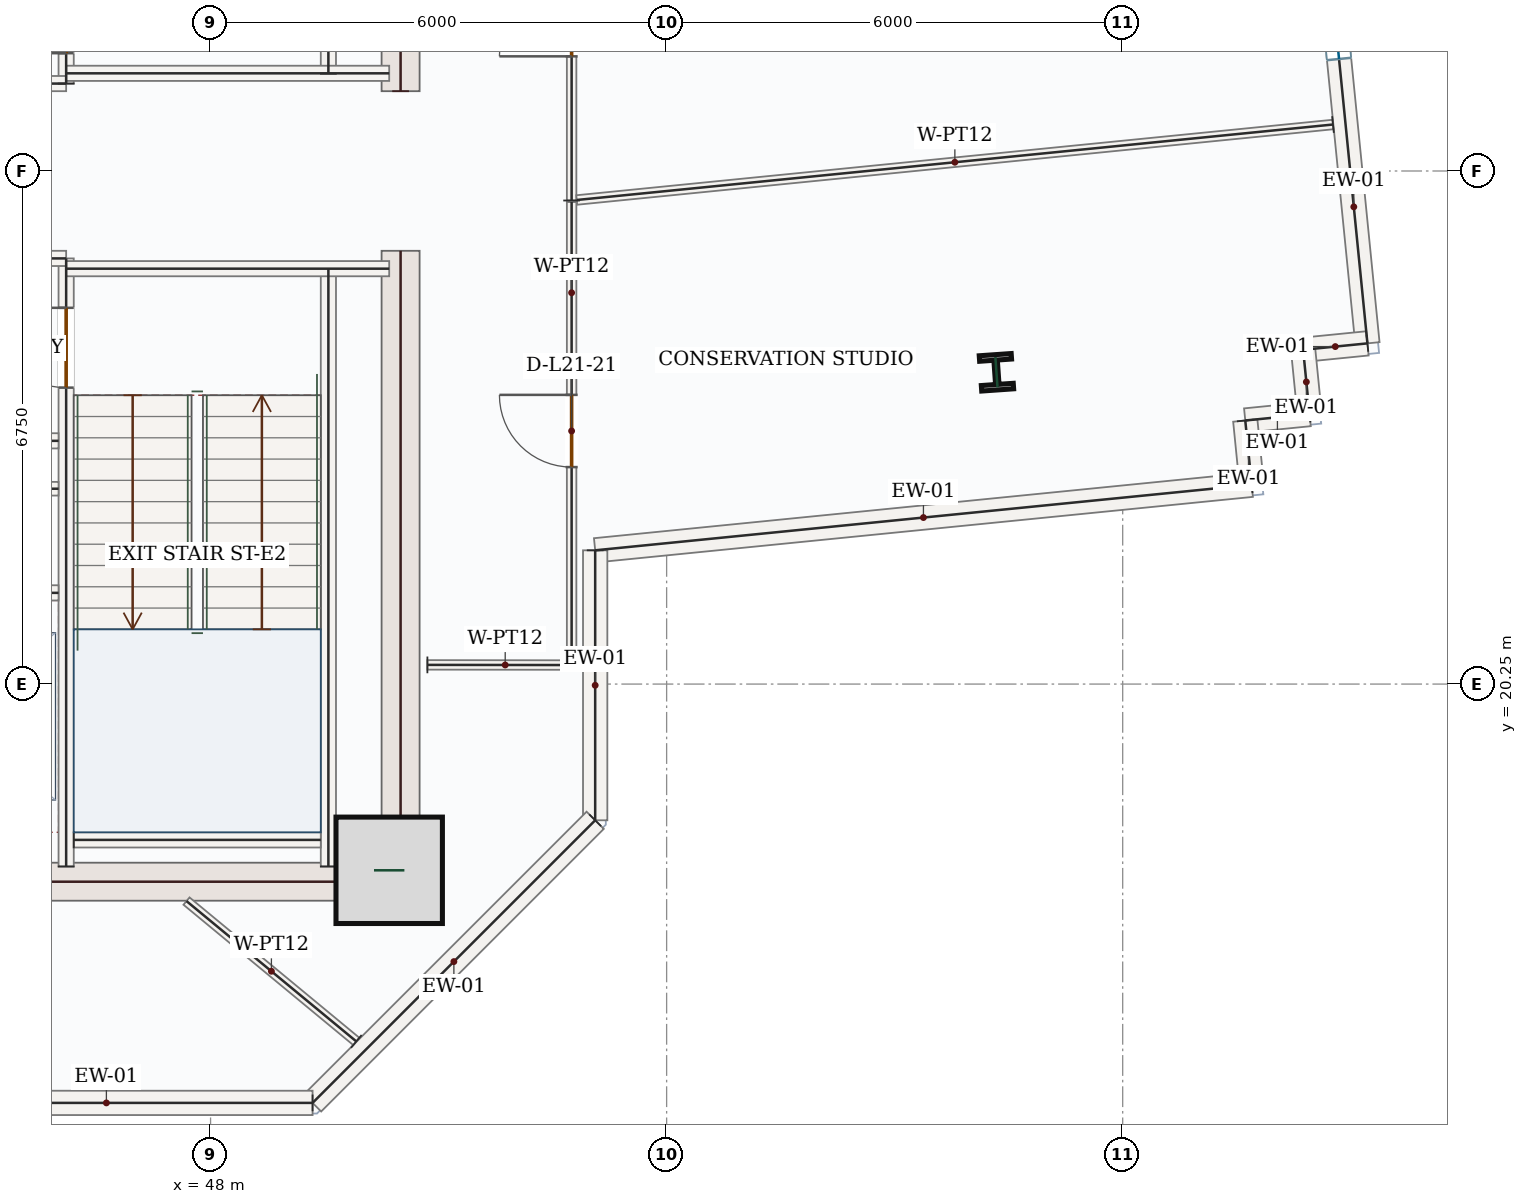
"""IFC4 building model, lengths in metres.
Left out: names, types, materials, properties, quantities, classifications, styles, units other than length and angle.
Written with IfcOpenShell. Run it as: python <this file> out.ifc"""

import sys

from ifc_helpers import new_model, si_unit, direction, frame, frame_2d, origin, origin_2d, place, context, subcontext, project, spatial, rectangle, i_section, extrude, source, transform, mapped, element, fill, save


model = new_model("IFC4")
c1 = context("Model", 3, precision=1e-05, world=origin(), true_north=direction((0.0, 1.0)))
c2 = subcontext(c1, "Body", "Model", "MODEL_VIEW")
j1 = project(units=[si_unit("LENGTHUNIT", "METRE"), si_unit("PLANEANGLEUNIT", "RADIAN")], contexts=[c1])
p1 = place(None, origin())
s1 = spatial("IfcSite", under=j1, at=p1, CompositionType="ELEMENT")
p2 = place(p1, origin())
s2 = spatial("IfcBuilding", under=s1, at=p2, CompositionType="ELEMENT")
p3 = place(p2, frame((0.0, 0.0, 96.3)))
s3 = spatial("IfcBuildingStorey", under=s2, at=p3, CompositionType="ELEMENT", Elevation=96.3)
m1 = source(origin(), c2, "Body", "SweptSolid", [
    extrude(rectangle(XDim=8.55, YDim=0.5, at=frame_2d((4.275, 0.0))), origin(), (0.0, 0.0, 1.0), 3.95),
])
for number, where, z_axis, x_axis in (
    (1, (50.5, 17.4, 0.0), (0.0, 0.0, 1.0), (0.0, 1.0, 0.0)),
    (2, (50.5, 28.05, 0.0), (0.0, 0.0, 1.0), (0.0, 1.0, 0.0)),
):
    element("IfcWall", number, at=place(p3, frame(where, z_axis=z_axis, x_axis=x_axis)), inside=s3, PredefinedType="SHEAR", context=c2, shape_type="MappedRepresentation", body=[
        mapped(m1, transform((0.0, 0.0, 0.0), x_axis=(1.0, 0.0, 0.0), y_axis=(0.0, 1.0, 0.0), z_axis=(0.0, 0.0, 1.0), scale=1.0)),
    ])
m2 = source(origin(), c2, "Body", "SweptSolid", [
    extrude(rectangle(XDim=7.0, YDim=0.5, at=frame_2d((3.5, 0.0))), origin(), (0.0, 0.0, 1.0), 3.95),
])
p4 = place(p3, frame((43.25, 17.65, 0.0), z_axis=(0.0, 0.0, 1.0), x_axis=(1.0, 0.0, 0.0)))
e3 = element("IfcWall", 3, at=p4, inside=s3, PredefinedType="SHEAR", context=c2, shape_type="MappedRepresentation", body=[
    mapped(m2, transform((0.0, 0.0, 0.0), x_axis=(1.0, 0.0, 0.0), y_axis=(0.0, 1.0, 0.0), z_axis=(0.0, 0.0, 1.0), scale=1.0)),
])
m3 = source(origin(), c2, "Body", "SweptSolid", [
    extrude(rectangle(XDim=1.4, YDim=1.4, at=origin_2d()), origin(), (0.0, 0.0, 1.0), 4.2),
])
p5 = place(p3, frame((50.35, 17.8, 0.0), z_axis=(0.0, 0.0, 1.0), x_axis=(1.0, 0.0, 0.0)))
e4 = element("IfcColumn", 4, at=p5, inside=s3, PredefinedType="COLUMN", context=c2, shape_type="MappedRepresentation", body=[
    mapped(m3, transform((0.0, 0.0, 0.0), x_axis=(1.0, 0.0, 0.0), y_axis=(0.0, 1.0, 0.0), z_axis=(0.0, 0.0, 1.0), scale=1.0)),
])
m4 = source(origin(), c2, "Body", "SweptSolid", [
    extrude(i_section(OverallWidth=0.421, OverallDepth=0.465, WebThickness=0.045, FlangeThickness=0.073, FilletRadius=0.018, at=origin_2d()), origin(), (0.0, 0.0, 1.0), 4.2),
])
p6 = place(p3, frame((58.339, 24.352, 0.0), z_axis=(0.0, 0.0, 1.0), x_axis=(0.99756405026, 0.069756473744, 0.0)))
e5 = element("IfcColumn", 5, at=p6, inside=s3, PredefinedType="COLUMN", context=c2, shape_type="MappedRepresentation", body=[
    mapped(m4, transform((0.0, 0.0, 0.0), x_axis=(1.0, 0.0, 0.0), y_axis=(0.0, 1.0, 0.0), z_axis=(0.0, 0.0, 1.0), scale=1.0)),
])
p7 = place(p3, frame((62.235, 34.603, 0.0), z_axis=(0.0, 0.0, 1.0), x_axis=(0.099303907908, -0.995057151059, 0.0)))
e6 = element("IfcWall", 6, at=p7, inside=s3, PredefinedType="SOLIDWALL", context=c2, shape_type="SweptSolid", body=[
    extrude(rectangle(XDim=9.92, YDim=0.32, at=frame_2d((4.96, 0.0))), origin(), (0.0, 0.0, 1.0), 3.95),
])
p8 = place(p7, frame((3.76, 0.0, 0.85)))
e7 = element("IfcOpeningElement", 7, at=p8, cuts=e6, PredefinedType="OPENING", context=c2, shape_type="SweptSolid", body=[
    extrude(rectangle(XDim=2.4, YDim=1.8, at=frame_2d((1.2, 0.9))), frame((0.0, 0.17, 0.0), z_axis=(0.0, -1.0, 0.0), x_axis=(1.0, 0.0, 0.0)), (0.0, 0.0, 1.0), 0.34),
])
m5 = source(origin(), c2, "Body", "SweptSolid", [
    extrude(rectangle(XDim=0.85, YDim=0.32, at=frame_2d((0.425, 0.0))), origin(), (0.0, 0.0, 1.0), 3.95),
])
for number, where, z_axis, x_axis in (
    (8, (63.22, 24.732, 0.0), (0.0, 0.0, 1.0), (-0.995, -0.099, 0.0)),
    (9, (62.374, 24.648, 0.0), (0.0, 0.0, 1.0), (0.099, -0.995, 0.0)),
    (10, (62.458, 23.802, 0.0), (0.0, 0.0, 1.0), (-0.995, -0.099, 0.0)),
    (11, (61.613, 23.718, 0.0), (0.0, 0.0, 1.0), (0.099, -0.995, 0.0)),
):
    element("IfcWall", number, at=place(p3, frame(where, z_axis=z_axis, x_axis=x_axis)), inside=s3, PredefinedType="SOLIDWALL", context=c2, shape_type="MappedRepresentation", body=[
        mapped(m5, transform((0.0, 0.0, 0.0), x_axis=(1.0, 0.0, 0.0), y_axis=(0.0, 1.0, 0.0), z_axis=(0.0, 0.0, 1.0), scale=1.0)),
    ])
m6 = source(origin(), c2, "Body", "SweptSolid", [
    extrude(rectangle(XDim=8.68, YDim=0.32, at=frame_2d((4.34, 0.0))), origin(), (0.0, 0.0, 1.0), 3.95),
])
p9 = place(p3, frame((61.697, 22.872, 0.0), z_axis=(0.0, 0.0, 1.0), x_axis=(-0.995055831351, -0.099317130918, 0.0)))
e12 = element("IfcWall", 12, at=p9, inside=s3, PredefinedType="SOLIDWALL", context=c2, shape_type="MappedRepresentation", body=[
    mapped(m6, transform((0.0, 0.0, 0.0), x_axis=(1.0, 0.0, 0.0), y_axis=(0.0, 1.0, 0.0), z_axis=(0.0, 0.0, 1.0), scale=1.0)),
])
m7 = source(origin(), c2, "Body", "SweptSolid", [
    extrude(rectangle(XDim=3.552, YDim=0.32, at=frame_2d((1.776, 0.0))), origin(), (0.0, 0.0, 1.0), 3.95),
])
p10 = place(p3, frame((53.06, 22.01, 0.0), z_axis=(0.0, 0.0, 1.0), x_axis=(0.0, -1.0, 0.0)))
e13 = element("IfcWall", 13, at=p10, inside=s3, PredefinedType="SOLIDWALL", context=c2, shape_type="MappedRepresentation", body=[
    mapped(m7, transform((0.0, 0.0, 0.0), x_axis=(1.0, 0.0, 0.0), y_axis=(0.0, 1.0, 0.0), z_axis=(0.0, 0.0, 1.0), scale=1.0)),
])
m8 = source(origin(), c2, "Body", "SweptSolid", [
    extrude(rectangle(XDim=5.258, YDim=0.32, at=frame_2d((2.629, 0.0))), origin(), (0.0, 0.0, 1.0), 3.95),
])
p11 = place(p3, frame((53.06, 18.458, 0.0), z_axis=(0.0, 0.0, 1.0), x_axis=(-0.707106781187, -0.707106781187, 0.0)))
e14 = element("IfcWall", 14, at=p11, inside=s3, PredefinedType="SOLIDWALL", context=c2, shape_type="MappedRepresentation", body=[
    mapped(m8, transform((0.0, 0.0, 0.0), x_axis=(1.0, 0.0, 0.0), y_axis=(0.0, 1.0, 0.0), z_axis=(0.0, 0.0, 1.0), scale=1.0)),
])
m9 = source(origin(), c2, "Body", "SweptSolid", [
    extrude(rectangle(XDim=5.425, YDim=0.32, at=frame_2d((2.713, 0.0))), origin(), (0.0, 0.0, 1.0), 3.95),
])
p12 = place(p3, frame((49.342, 14.74, 0.0), z_axis=(0.0, 0.0, 1.0), x_axis=(-1.0, 0.0, 0.0)))
e15 = element("IfcWall", 15, at=p12, inside=s3, PredefinedType="SOLIDWALL", context=c2, shape_type="MappedRepresentation", body=[
    mapped(m9, transform((0.0, 0.0, 0.0), x_axis=(1.0, 0.0, 0.0), y_axis=(0.0, 1.0, 0.0), z_axis=(0.0, 0.0, 1.0), scale=1.0)),
])
m10 = source(origin(), c2, "Body", "SweptSolid", [
    extrude(rectangle(XDim=7.87, YDim=0.2, at=frame_2d((3.935, 0.0))), origin(), (0.0, 0.0, 1.0), 3.95),
])
for number, where, z_axis, x_axis in (
    (16, (49.55, 17.85, 0.0), (0.0, 0.0, 1.0), (0.0, 1.0, 0.0)),
    (17, (49.55, 28.28, 0.0), (0.0, 0.0, 1.0), (0.0, 1.0, 0.0)),
):
    element("IfcWall", number, at=place(p3, frame(where, z_axis=z_axis, x_axis=x_axis)), inside=s3, PredefinedType="SOLIDWALL", context=c2, shape_type="MappedRepresentation", body=[
        mapped(m10, transform((0.0, 0.0, 0.0), x_axis=(1.0, 0.0, 0.0), y_axis=(0.0, 1.0, 0.0), z_axis=(0.0, 0.0, 1.0), scale=1.0)),
    ])
p13 = place(p3, frame((46.1, 17.85, 0.0), z_axis=(0.0, 0.0, 1.0), x_axis=(0.0, 1.0, 0.0)))
e18 = element("IfcWall", 18, at=p13, inside=s3, PredefinedType="SOLIDWALL", context=c2, shape_type="SweptSolid", body=[
    extrude(rectangle(XDim=8.0, YDim=0.2, at=frame_2d((4.0, 0.0))), origin(), (0.0, 0.0, 1.0), 3.95),
])
p14 = place(p13, frame((6.3, 0.0, 0.0)))
e19 = element("IfcOpeningElement", 19, at=p14, cuts=e18, PredefinedType="OPENING", context=c2, shape_type="SweptSolid", body=[
    extrude(rectangle(XDim=1.05, YDim=2.15, at=frame_2d((0.525, 1.075))), frame((0.0, 0.11, 0.0), z_axis=(0.0, -1.0, 0.0), x_axis=(1.0, 0.0, 0.0)), (0.0, 0.0, 1.0), 0.22),
])
p15 = place(p3, frame((46.1, 28.15, 0.0), z_axis=(0.0, 0.0, 1.0), x_axis=(0.0, 1.0, 0.0)))
e20 = element("IfcWall", 20, at=p15, inside=s3, PredefinedType="SOLIDWALL", context=c2, shape_type="SweptSolid", body=[
    extrude(rectangle(XDim=8.0, YDim=0.2, at=frame_2d((4.0, 0.0))), origin(), (0.0, 0.0, 1.0), 3.95),
])
p16 = place(p15, frame((0.4, 0.0, 0.0)))
e21 = element("IfcOpeningElement", 21, at=p16, cuts=e20, PredefinedType="OPENING", context=c2, shape_type="SweptSolid", body=[
    extrude(rectangle(XDim=1.05, YDim=2.15, at=frame_2d((0.525, 1.075))), frame((0.0, 0.11, 0.0), z_axis=(0.0, -1.0, 0.0), x_axis=(1.0, 0.0, 0.0)), (0.0, 0.0, 1.0), 0.22),
])
m11 = source(origin(), c2, "Body", "SweptSolid", [
    extrude(rectangle(XDim=3.0, YDim=0.2, at=frame_2d((1.5, 0.0))), origin(), (0.0, 0.0, 1.0), 3.95),
])
p17 = place(p3, frame((43.1, 25.85, 0.0), z_axis=(0.0, 0.0, 1.0), x_axis=(1.0, 0.0, 0.0)))
e22 = element("IfcWall", 22, at=p17, inside=s3, PredefinedType="SOLIDWALL", context=c2, shape_type="MappedRepresentation", body=[
    mapped(m11, transform((0.0, 0.0, 0.0), x_axis=(1.0, 0.0, 0.0), y_axis=(0.0, 1.0, 0.0), z_axis=(0.0, 0.0, 1.0), scale=1.0)),
])
m12 = source(origin(), c2, "Body", "SweptSolid", [
    extrude(rectangle(XDim=4.25, YDim=0.2, at=frame_2d((2.125, 0.0))), origin(), (0.0, 0.0, 1.0), 3.95),
])
p18 = place(p3, frame((46.1, 25.715, 0.0), z_axis=(0.0, 0.0, 1.0), x_axis=(1.0, 0.0, 0.0)))
e23 = element("IfcWall", 23, at=p18, inside=s3, PredefinedType="SOLIDWALL", context=c2, shape_type="MappedRepresentation", body=[
    mapped(m12, transform((0.0, 0.0, 0.0), x_axis=(1.0, 0.0, 0.0), y_axis=(0.0, 1.0, 0.0), z_axis=(0.0, 0.0, 1.0), scale=1.0)),
])
p19 = place(p3, frame((43.1, 28.15, 0.0), z_axis=(0.0, 0.0, 1.0), x_axis=(1.0, 0.0, 0.0)))
e24 = element("IfcWall", 24, at=p19, inside=s3, PredefinedType="SOLIDWALL", context=c2, shape_type="MappedRepresentation", body=[
    mapped(m11, transform((0.0, 0.0, 0.0), x_axis=(1.0, 0.0, 0.0), y_axis=(0.0, 1.0, 0.0), z_axis=(0.0, 0.0, 1.0), scale=1.0)),
])
p20 = place(p3, frame((46.1, 28.285, 0.0), z_axis=(0.0, 0.0, 1.0), x_axis=(1.0, 0.0, 0.0)))
e25 = element("IfcWall", 25, at=p20, inside=s3, PredefinedType="SOLIDWALL", context=c2, shape_type="MappedRepresentation", body=[
    mapped(m12, transform((0.0, 0.0, 0.0), x_axis=(1.0, 0.0, 0.0), y_axis=(0.0, 1.0, 0.0), z_axis=(0.0, 0.0, 1.0), scale=1.0)),
])
m13 = source(origin(), c2, "Body", "SweptSolid", [
    extrude(rectangle(XDim=3.25, YDim=0.2, at=frame_2d((1.625, 0.0))), origin(), (0.0, 0.0, 1.0), 3.95),
])
p21 = place(p3, frame((46.2, 18.2, 0.0), z_axis=(0.0, 0.0, 1.0), x_axis=(1.0, 0.0, 0.0)))
e26 = element("IfcWall", 26, at=p21, inside=s3, PredefinedType="SOLIDWALL", context=c2, shape_type="MappedRepresentation", body=[
    mapped(m13, transform((0.0, 0.0, 0.0), x_axis=(1.0, 0.0, 0.0), y_axis=(0.0, 1.0, 0.0), z_axis=(0.0, 0.0, 1.0), scale=1.0)),
])
m14 = source(origin(), c2, "Body", "SweptSolid", [
    extrude(rectangle(XDim=2.75, YDim=0.2, at=frame_2d((1.375, 0.0))), origin(), (0.0, 0.0, 1.0), 3.95),
])
for number, where, z_axis, x_axis in (
    (27, (43.25, 23.45, 0.0), (0.0, 0.0, 1.0), (1.0, 0.0, 0.0)),
    (28, (43.25, 21.45, 0.0), (0.0, 0.0, 1.0), (1.0, 0.0, 0.0)),
):
    element("IfcWall", number, at=place(p3, frame(where, z_axis=z_axis, x_axis=x_axis)), inside=s3, PredefinedType="SOLIDWALL", context=c2, shape_type="MappedRepresentation", body=[
        mapped(m14, transform((0.0, 0.0, 0.0), x_axis=(1.0, 0.0, 0.0), y_axis=(0.0, 1.0, 0.0), z_axis=(0.0, 0.0, 1.0), scale=1.0)),
    ])
m15 = source(origin(), c2, "Body", "SweptSolid", [
    extrude(rectangle(XDim=2.75, YDim=0.18, at=frame_2d((1.375, 0.0))), origin(), (0.0, 0.0, 1.0), 3.95),
])
p22 = place(p3, frame((43.25, 22.82, 0.0), z_axis=(0.0, 0.0, 1.0), x_axis=(1.0, 0.0, 0.0)))
e29 = element("IfcWall", 29, at=p22, inside=s3, PredefinedType="PARTITIONING", context=c2, shape_type="MappedRepresentation", body=[
    mapped(m15, transform((0.0, 0.0, 0.0), x_axis=(1.0, 0.0, 0.0), y_axis=(0.0, 1.0, 0.0), z_axis=(0.0, 0.0, 1.0), scale=1.0)),
])
p23 = place(p3, frame((52.75, 26.612, 0.0), z_axis=(0.0, 0.0, 1.0), x_axis=(0.0, 1.0, 0.0)))
e30 = element("IfcWall", 30, at=p23, inside=s3, PredefinedType="PARTITIONING", context=c2, shape_type="SweptSolid", body=[
    extrude(rectangle(XDim=4.743, YDim=0.125, at=frame_2d((2.372, 0.0))), origin(), (0.0, 0.0, 1.0), 3.95),
])
p24 = place(p23, frame((1.897, 0.0, 0.0)))
e31 = element("IfcOpeningElement", 31, at=p24, cuts=e30, PredefinedType="OPENING", context=c2, shape_type="SweptSolid", body=[
    extrude(rectangle(XDim=0.95, YDim=2.15, at=frame_2d((0.475, 1.075))), frame((0.0, 0.073, 0.0), z_axis=(0.0, -1.0, 0.0), x_axis=(1.0, 0.0, 0.0)), (0.0, 0.0, 1.0), 0.145),
])
m16 = source(origin(), c2, "Body", "SweptSolid", [
    extrude(rectangle(XDim=9.999, YDim=0.125, at=frame_2d((5.0, 0.0))), origin(), (0.0, 0.0, 1.0), 3.95),
])
p25 = place(p3, frame((62.767, 27.612, 0.0), z_axis=(0.0, 0.0, 1.0), x_axis=(-0.995054581391, -0.099329653443, 0.0)))
e32 = element("IfcWall", 32, at=p25, inside=s3, PredefinedType="PARTITIONING", context=c2, shape_type="MappedRepresentation", body=[
    mapped(m16, transform((0.0, 0.0, 0.0), x_axis=(1.0, 0.0, 0.0), y_axis=(0.0, 1.0, 0.0), z_axis=(0.0, 0.0, 1.0), scale=1.0)),
])
m17 = source(origin(), c2, "Body", "SweptSolid", [
    extrude(rectangle(XDim=2.047, YDim=0.125, at=frame_2d((1.024, 0.0))), origin(), (0.0, 0.0, 1.0), 3.95),
])
p26 = place(p3, frame((50.853, 20.502, 0.0), z_axis=(0.0, 0.0, 1.0), x_axis=(0.999999289016, -0.001192462782, 0.0)))
e33 = element("IfcWall", 33, at=p26, inside=s3, PredefinedType="PARTITIONING", context=c2, shape_type="MappedRepresentation", body=[
    mapped(m17, transform((0.0, 0.0, 0.0), x_axis=(1.0, 0.0, 0.0), y_axis=(0.0, 1.0, 0.0), z_axis=(0.0, 0.0, 1.0), scale=1.0)),
])
p27 = place(p3, frame((52.75, 20.568, 0.0), z_axis=(0.0, 0.0, 1.0), x_axis=(0.0, 1.0, 0.0)))
e34 = element("IfcWall", 34, at=p27, inside=s3, PredefinedType="PARTITIONING", context=c2, shape_type="SweptSolid", body=[
    extrude(rectangle(XDim=6.024, YDim=0.125, at=frame_2d((3.012, 0.0))), origin(), (0.0, 0.0, 1.0), 3.95),
])
p28 = place(p27, frame((2.537, 0.0, 0.0)))
e35 = element("IfcOpeningElement", 35, at=p28, cuts=e34, PredefinedType="OPENING", context=c2, shape_type="SweptSolid", body=[
    extrude(rectangle(XDim=0.95, YDim=2.15, at=frame_2d((0.475, 1.075))), frame((0.0, 0.073, 0.0), z_axis=(0.0, -1.0, 0.0), x_axis=(1.0, 0.0, 0.0)), (0.0, 0.0, 1.0), 0.145),
])
m18 = source(origin(), c2, "Body", "SweptSolid", [
    extrude(rectangle(XDim=2.898, YDim=0.125, at=frame_2d((1.449, 0.0))), origin(), (0.0, 0.0, 1.0), 3.95),
])
p29 = place(p3, frame((49.917, 15.549, 0.0), z_axis=(0.0, 0.0, 1.0), x_axis=(-0.770859236659, 0.637005523726, 0.0)))
e36 = element("IfcWall", 36, at=p29, inside=s3, PredefinedType="PARTITIONING", context=c2, shape_type="MappedRepresentation", body=[
    mapped(m18, transform((0.0, 0.0, 0.0), x_axis=(1.0, 0.0, 0.0), y_axis=(0.0, 1.0, 0.0), z_axis=(0.0, 0.0, 1.0), scale=1.0)),
])
m19 = source(origin(), c2, "Body", "SweptSolid", [
    extrude(rectangle(XDim=2.4, YDim=1.8, at=frame_2d((1.2, 0.9))), frame((0.0, 0.03, 0.0), z_axis=(0.0, -1.0, 0.0), x_axis=(1.0, 0.0, 0.0)), (0.0, 0.0, 1.0), 0.06),
])
p30 = place(p8, origin())
e37 = element("IfcWindow", 37, at=p30, inside=s3, PartitioningType="DOUBLE_PANEL_VERTICAL", PredefinedType="WINDOW", context=c2, shape_type="MappedRepresentation", body=[
    mapped(m19, transform((0.0, 0.0, 0.0), x_axis=(1.0, 0.0, 0.0), y_axis=(0.0, 1.0, 0.0), z_axis=(0.0, 0.0, 1.0), scale=1.0)),
])
fill(e7, e37)
m20 = source(origin(), c2, "Body", "SweptSolid", [
    extrude(rectangle(XDim=1.05, YDim=2.15, at=frame_2d((0.525, 1.075))), frame((0.0, 0.025, 0.0), z_axis=(0.0, -1.0, 0.0), x_axis=(1.0, 0.0, 0.0)), (0.0, 0.0, 1.0), 0.05),
])
p31 = place(p16, origin())
e38 = element("IfcDoor", 38, at=p31, inside=s3, OperationType="SINGLE_SWING_LEFT", PredefinedType="DOOR", context=c2, shape_type="MappedRepresentation", body=[
    mapped(m20, transform((0.0, 0.0, 0.0), x_axis=(1.0, 0.0, 0.0), y_axis=(0.0, 1.0, 0.0), z_axis=(0.0, 0.0, 1.0), scale=1.0)),
])
fill(e21, e38)
p32 = place(p14, origin())
e39 = element("IfcDoor", 39, at=p32, inside=s3, OperationType="SINGLE_SWING_RIGHT", PredefinedType="DOOR", context=c2, shape_type="MappedRepresentation", body=[
    mapped(m20, transform((0.0, 0.0, 0.0), x_axis=(1.0, 0.0, 0.0), y_axis=(0.0, 1.0, 0.0), z_axis=(0.0, 0.0, 1.0), scale=1.0)),
])
fill(e19, e39)
m21 = source(origin(), c2, "Body", "SweptSolid", [
    extrude(rectangle(XDim=0.95, YDim=2.15, at=frame_2d((0.475, 1.075))), frame((0.0, 0.025, 0.0), z_axis=(0.0, -1.0, 0.0), x_axis=(1.0, 0.0, 0.0)), (0.0, 0.0, 1.0), 0.05),
])
p33 = place(p28, origin())
e40 = element("IfcDoor", 40, at=p33, inside=s3, OperationType="SINGLE_SWING_RIGHT", PredefinedType="DOOR", context=c2, shape_type="MappedRepresentation", body=[
    mapped(m21, transform((0.0, 0.0, 0.0), x_axis=(1.0, 0.0, 0.0), y_axis=(0.0, 1.0, 0.0), z_axis=(0.0, 0.0, 1.0), scale=1.0)),
])
fill(e35, e40)
p34 = place(p24, origin())
e41 = element("IfcDoor", 41, at=p34, inside=s3, OperationType="SINGLE_SWING_LEFT", PredefinedType="DOOR", context=c2, shape_type="MappedRepresentation", body=[
    mapped(m21, transform((0.0, 0.0, 0.0), x_axis=(1.0, 0.0, 0.0), y_axis=(0.0, 1.0, 0.0), z_axis=(0.0, 0.0, 1.0), scale=1.0)),
])
fill(e31, e41)
save(model, sys.argv[1])
